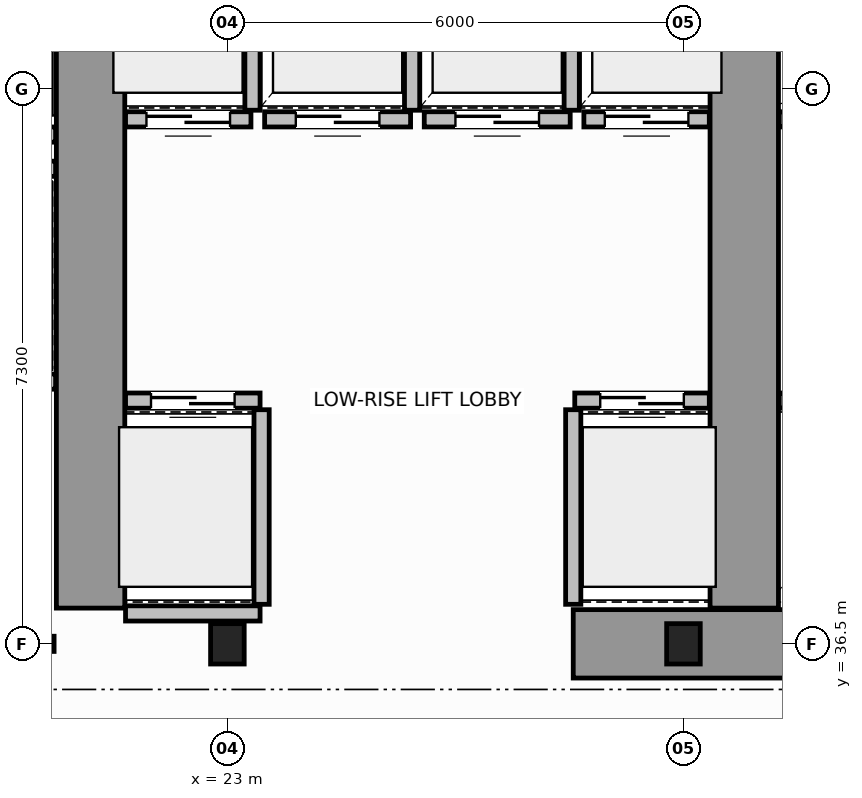
"""IFC4 building model, lengths in metres.
Left out: names, types, materials, properties, quantities, classifications, styles, units other than length and angle.
Written with IfcOpenShell. Run it as: python <this file> out.ifc"""

import sys

from ifc_helpers import new_model, si_unit, direction, frame, frame_2d, origin, origin_2d, place, context, subcontext, project, spatial, rectangle, i_section, extrude, source, transform, mapped, element, fill, save


model = new_model("IFC4")
c1 = context("Model", 3, precision=1e-05, world=origin(), true_north=direction((0.0, 1.0)))
c2 = subcontext(c1, "Body", "Model", "MODEL_VIEW")
j1 = project(units=[si_unit("LENGTHUNIT", "METRE"), si_unit("PLANEANGLEUNIT", "RADIAN")], contexts=[c1])
p1 = place(None, origin())
s1 = spatial("IfcSite", under=j1, at=p1, CompositionType="ELEMENT")
p2 = place(p1, origin())
s2 = spatial("IfcBuilding", under=s1, at=p2, CompositionType="ELEMENT")
p3 = place(p2, frame((0.0, 0.0, 79.6)))
s3 = spatial("IfcBuildingStorey", under=s2, at=p3, CompositionType="ELEMENT", Elevation=79.6)
m1 = source(origin(), c2, "Body", "SweptSolid", [
    extrude(i_section(OverallWidth=0.442, OverallDepth=0.531, WebThickness=0.065, FlangeThickness=0.076, FilletRadius=0.015, at=origin_2d()), origin(), (0.0, 0.0, 1.0), 3.8),
])
for number, where, z_axis, x_axis in (
    (1, (23.0, 36.5, 0.0), (0.0, 0.0, 1.0), (1.0, 0.0, 0.0)),
    (2, (29.0, 36.5, 0.0), (0.0, 0.0, 1.0), (1.0, 0.0, 0.0)),
):
    element("IfcColumn", number, at=place(p3, frame(where, z_axis=z_axis, x_axis=x_axis)), inside=s3, PredefinedType="COLUMN", context=c2, shape_type="MappedRepresentation", body=[
        mapped(m1, transform((0.0, 0.0, 0.0), scale=1.0)),
    ])
p4 = place(p3, frame((27.55, 36.5, 0.0), z_axis=(0.0, 0.0, 1.0), x_axis=(1.0, 0.0, 0.0)))
e3 = element("IfcWall", 3, at=p4, inside=s3, PredefinedType="SHEAR", context=c2, shape_type="SweptSolid", body=[
    extrude(rectangle(XDim=4.5, YDim=0.9, at=frame_2d((2.25, 0.0))), origin(), (0.0, 0.0, 1.0), 3.8),
])
for number, where, z_axis, x_axis in (
    (4, (21.2, 36.97, 0.0), (0.0, 0.0, 1.0), (0.0, 1.0, 0.0)),
    (5, (29.8, 36.97, 0.0), (0.0, 0.0, 1.0), (0.0, 1.0, 0.0)),
):
    element("IfcWall", number, at=place(p3, frame(where, z_axis=z_axis, x_axis=x_axis)), inside=s3, PredefinedType="SHEAR", context=c2, shape_type="SweptSolid", body=[
        extrude(rectangle(XDim=9.23, YDim=0.9, at=frame_2d((4.615, 0.0))), origin(), (0.0, 0.0, 1.0), 3.8),
    ])
p5 = place(p3, frame((18.25, 36.5, 0.0), z_axis=(0.0, 0.0, 1.0), x_axis=(1.0, 0.0, 0.0)))
e6 = element("IfcWall", 6, at=p5, inside=s3, PredefinedType="SOLIDWALL", context=c2, shape_type="SweptSolid", body=[
    extrude(rectangle(XDim=2.47, YDim=0.2, at=frame_2d((1.235, 0.0))), origin(), (0.0, 0.0, 1.0), 2.33),
])
p6 = place(p5, frame((0.65, 0.0, 0.0)))
e7 = element("IfcOpeningElement", 7, at=p6, cuts=e6, PredefinedType="OPENING", context=c2, shape_type="SweptSolid", body=[
    extrude(rectangle(XDim=1.1, YDim=2.15, at=frame_2d((0.55, 1.075))), frame((0.0, 0.11, 0.0), z_axis=(0.0, -1.0, 0.0), x_axis=(1.0, 0.0, 0.0)), (0.0, 0.0, 1.0), 0.22),
])
p7 = place(p3, frame((21.66, 39.7, 0.0), z_axis=(0.0, 0.0, 1.0), x_axis=(1.0, 0.0, 0.0)))
e8 = element("IfcWall", 8, at=p7, inside=s3, PredefinedType="SOLIDWALL", context=c2, shape_type="SweptSolid", body=[
    extrude(rectangle(XDim=1.77, YDim=0.2, at=frame_2d((0.885, 0.0))), origin(), (0.0, 0.0, 1.0), 3.54),
])
p8 = place(p7, frame((0.335, 0.0, 0.0)))
e9 = element("IfcOpeningElement", 9, at=p8, cuts=e8, PredefinedType="OPENING", context=c2, shape_type="SweptSolid", body=[
    extrude(rectangle(XDim=1.1, YDim=2.15, at=frame_2d((0.55, 1.075))), frame((0.0, 0.11, 0.0), z_axis=(0.0, -1.0, 0.0), x_axis=(1.0, 0.0, 0.0)), (0.0, 0.0, 1.0), 0.22),
])
p9 = place(p3, frame((21.66, 36.9, 0.0), z_axis=(0.0, 0.0, 1.0), x_axis=(1.0, 0.0, 0.0)))
e10 = element("IfcWall", 10, at=p9, inside=s3, PredefinedType="SOLIDWALL", context=c2, shape_type="SweptSolid", body=[
    extrude(rectangle(XDim=1.77, YDim=0.2, at=frame_2d((0.885, 0.0))), origin(), (0.0, 0.0, 1.0), 2.33),
])
p10 = place(p3, frame((23.45, 37.02, 0.0), z_axis=(0.0, 0.0, 1.0), x_axis=(0.0, 1.0, 0.0)))
e11 = element("IfcWall", 11, at=p10, inside=s3, PredefinedType="SOLIDWALL", context=c2, shape_type="SweptSolid", body=[
    extrude(rectangle(XDim=2.56, YDim=0.2, at=frame_2d((1.28, 0.0))), origin(), (0.0, 0.0, 1.0), 3.54),
])
p11 = place(p3, frame((27.57, 39.7, 0.0), z_axis=(0.0, 0.0, 1.0), x_axis=(1.0, 0.0, 0.0)))
e12 = element("IfcWall", 12, at=p11, inside=s3, PredefinedType="SOLIDWALL", context=c2, shape_type="SweptSolid", body=[
    extrude(rectangle(XDim=1.77, YDim=0.2, at=frame_2d((0.885, 0.0))), origin(), (0.0, 0.0, 1.0), 3.54),
])
p12 = place(p11, frame((0.335, 0.0, 0.0)))
e13 = element("IfcOpeningElement", 13, at=p12, cuts=e12, PredefinedType="OPENING", context=c2, shape_type="SweptSolid", body=[
    extrude(rectangle(XDim=1.1, YDim=2.15, at=frame_2d((0.55, 1.075))), frame((0.0, 0.11, 0.0), z_axis=(0.0, -1.0, 0.0), x_axis=(1.0, 0.0, 0.0)), (0.0, 0.0, 1.0), 0.22),
])
p13 = place(p3, frame((27.55, 37.02, 0.0), z_axis=(0.0, 0.0, 1.0), x_axis=(0.0, 1.0, 0.0)))
e14 = element("IfcWall", 14, at=p13, inside=s3, PredefinedType="SOLIDWALL", context=c2, shape_type="SweptSolid", body=[
    extrude(rectangle(XDim=2.56, YDim=0.2, at=frame_2d((1.28, 0.0))), origin(), (0.0, 0.0, 1.0), 3.54),
])
p14 = place(p3, frame((21.66, 43.4, 0.0), z_axis=(0.0, 0.0, 1.0), x_axis=(1.0, 0.0, 0.0)))
e15 = element("IfcWall", 15, at=p14, inside=s3, PredefinedType="SOLIDWALL", context=c2, shape_type="SweptSolid", body=[
    extrude(rectangle(XDim=1.65, YDim=0.2, at=frame_2d((0.825, 0.0))), origin(), (0.0, 0.0, 1.0), 3.54),
])
p15 = place(p14, frame((0.275, 0.0, 0.0)))
e16 = element("IfcOpeningElement", 16, at=p15, cuts=e15, PredefinedType="OPENING", context=c2, shape_type="SweptSolid", body=[
    extrude(rectangle(XDim=1.1, YDim=2.15, at=frame_2d((0.55, 1.075))), frame((0.0, 0.11, 0.0), z_axis=(0.0, -1.0, 0.0), x_axis=(1.0, 0.0, 0.0)), (0.0, 0.0, 1.0), 0.22),
])
p16 = place(p3, frame((23.33, 43.52, 0.0), z_axis=(0.0, 0.0, 1.0), x_axis=(0.0, 1.0, 0.0)))
e17 = element("IfcWall", 17, at=p16, inside=s3, PredefinedType="SOLIDWALL", context=c2, shape_type="SweptSolid", body=[
    extrude(rectangle(XDim=2.56, YDim=0.2, at=frame_2d((1.28, 0.0))), origin(), (0.0, 0.0, 1.0), 3.54),
])
p17 = place(p3, frame((23.49, 43.4, 0.0), z_axis=(0.0, 0.0, 1.0), x_axis=(1.0, 0.0, 0.0)))
e18 = element("IfcWall", 18, at=p17, inside=s3, PredefinedType="SOLIDWALL", context=c2, shape_type="SweptSolid", body=[
    extrude(rectangle(XDim=1.92, YDim=0.2, at=frame_2d((0.96, 0.0))), origin(), (0.0, 0.0, 1.0), 3.54),
])
p18 = place(p17, frame((0.41, 0.0, 0.0)))
e19 = element("IfcOpeningElement", 19, at=p18, cuts=e18, PredefinedType="OPENING", context=c2, shape_type="SweptSolid", body=[
    extrude(rectangle(XDim=1.1, YDim=2.15, at=frame_2d((0.55, 1.075))), frame((0.0, 0.11, 0.0), z_axis=(0.0, -1.0, 0.0), x_axis=(1.0, 0.0, 0.0)), (0.0, 0.0, 1.0), 0.22),
])
p19 = place(p3, frame((25.43, 43.52, 0.0), z_axis=(0.0, 0.0, 1.0), x_axis=(0.0, 1.0, 0.0)))
e20 = element("IfcWall", 20, at=p19, inside=s3, PredefinedType="SOLIDWALL", context=c2, shape_type="SweptSolid", body=[
    extrude(rectangle(XDim=2.56, YDim=0.2, at=frame_2d((1.28, 0.0))), origin(), (0.0, 0.0, 1.0), 3.54),
])
p20 = place(p3, frame((25.59, 43.4, 0.0), z_axis=(0.0, 0.0, 1.0), x_axis=(1.0, 0.0, 0.0)))
e21 = element("IfcWall", 21, at=p20, inside=s3, PredefinedType="SOLIDWALL", context=c2, shape_type="SweptSolid", body=[
    extrude(rectangle(XDim=1.92, YDim=0.2, at=frame_2d((0.96, 0.0))), origin(), (0.0, 0.0, 1.0), 3.54),
])
p21 = place(p20, frame((0.41, 0.0, 0.0)))
e22 = element("IfcOpeningElement", 22, at=p21, cuts=e21, PredefinedType="OPENING", context=c2, shape_type="SweptSolid", body=[
    extrude(rectangle(XDim=1.1, YDim=2.15, at=frame_2d((0.55, 1.075))), frame((0.0, 0.11, 0.0), z_axis=(0.0, -1.0, 0.0), x_axis=(1.0, 0.0, 0.0)), (0.0, 0.0, 1.0), 0.22),
])
p22 = place(p3, frame((27.53, 43.52, 0.0), z_axis=(0.0, 0.0, 1.0), x_axis=(0.0, 1.0, 0.0)))
e23 = element("IfcWall", 23, at=p22, inside=s3, PredefinedType="SOLIDWALL", context=c2, shape_type="SweptSolid", body=[
    extrude(rectangle(XDim=2.56, YDim=0.2, at=frame_2d((1.28, 0.0))), origin(), (0.0, 0.0, 1.0), 3.54),
])
p23 = place(p3, frame((27.69, 43.4, 0.0), z_axis=(0.0, 0.0, 1.0), x_axis=(1.0, 0.0, 0.0)))
e24 = element("IfcWall", 24, at=p23, inside=s3, PredefinedType="SOLIDWALL", context=c2, shape_type="SweptSolid", body=[
    extrude(rectangle(XDim=1.65, YDim=0.2, at=frame_2d((0.825, 0.0))), origin(), (0.0, 0.0, 1.0), 3.54),
])
p24 = place(p23, frame((0.275, 0.0, 0.0)))
e25 = element("IfcOpeningElement", 25, at=p24, cuts=e24, PredefinedType="OPENING", context=c2, shape_type="SweptSolid", body=[
    extrude(rectangle(XDim=1.1, YDim=2.15, at=frame_2d((0.55, 1.075))), frame((0.0, 0.11, 0.0), z_axis=(0.0, -1.0, 0.0), x_axis=(1.0, 0.0, 0.0)), (0.0, 0.0, 1.0), 0.22),
])
p25 = place(p3, frame((30.26, 39.7, 0.0), z_axis=(0.0, 0.0, 1.0), x_axis=(1.0, 0.0, 0.0)))
e26 = element("IfcWall", 26, at=p25, inside=s3, PredefinedType="SOLIDWALL", context=c2, shape_type="SweptSolid", body=[
    extrude(rectangle(XDim=1.77, YDim=0.2, at=frame_2d((0.885, 0.0))), origin(), (0.0, 0.0, 1.0), 3.54),
])
p26 = place(p3, frame((30.26, 43.4, 0.0), z_axis=(0.0, 0.0, 1.0), x_axis=(1.0, 0.0, 0.0)))
e27 = element("IfcWall", 27, at=p26, inside=s3, PredefinedType="SOLIDWALL", context=c2, shape_type="SweptSolid", body=[
    extrude(rectangle(XDim=1.65, YDim=0.2, at=frame_2d((0.825, 0.0))), origin(), (0.0, 0.0, 1.0), 3.54),
])
p27 = place(p3, frame((18.67, 43.2, 0.0), z_axis=(0.0, 0.0, 1.0), x_axis=(1.0, 0.0, 0.0)))
e28 = element("IfcWall", 28, at=p27, inside=s3, PredefinedType="SOLIDWALL", context=c2, shape_type="SweptSolid", body=[
    extrude(rectangle(XDim=2.07, YDim=0.2, at=frame_2d((1.035, 0.0))), origin(), (0.0, 0.0, 1.0), 3.54),
])
p28 = place(p3, frame((18.67, 39.95, 0.0), z_axis=(0.0, 0.0, 1.0), x_axis=(1.0, 0.0, 0.0)))
e29 = element("IfcWall", 29, at=p28, inside=s3, PredefinedType="SOLIDWALL", context=c2, shape_type="SweptSolid", body=[
    extrude(rectangle(XDim=2.07, YDim=0.2, at=frame_2d((1.035, 0.0))), origin(), (0.0, 0.0, 1.0), 3.54),
])
p29 = place(p28, frame((0.485, 0.0, 0.0)))
e30 = element("IfcOpeningElement", 30, at=p29, cuts=e29, PredefinedType="OPENING", context=c2, shape_type="SweptSolid", body=[
    extrude(rectangle(XDim=1.1, YDim=2.15, at=frame_2d((0.55, 1.075))), frame((0.0, 0.11, 0.0), z_axis=(0.0, -1.0, 0.0), x_axis=(1.0, 0.0, 0.0)), (0.0, 0.0, 1.0), 0.22),
])
p30 = place(p3, frame((18.67, 42.75, 0.0), z_axis=(0.0, 0.0, 1.0), x_axis=(1.0, 0.0, 0.0)))
e31 = element("IfcWall", 31, at=p30, inside=s3, PredefinedType="SOLIDWALL", context=c2, shape_type="SweptSolid", body=[
    extrude(rectangle(XDim=2.07, YDim=0.2, at=frame_2d((1.035, 0.0))), origin(), (0.0, 0.0, 1.0), 3.54),
])
m2 = source(origin(), c2, "Body", "SweptSolid", [
    extrude(rectangle(XDim=1.1, YDim=2.15, at=frame_2d((0.55, 1.075))), frame((0.0, 0.025, 0.0), z_axis=(0.0, -1.0, 0.0), x_axis=(1.0, 0.0, 0.0)), (0.0, 0.0, 1.0), 0.05),
])
p31 = place(p8, origin())
e32 = element("IfcDoor", 32, at=p31, inside=s3, OperationType="DOUBLE_DOOR_SLIDING", PredefinedType="DOOR", context=c2, shape_type="MappedRepresentation", body=[
    mapped(m2, transform((0.0, 0.0, 0.0), scale=1.0)),
])
fill(e9, e32)
p32 = place(p12, origin())
e33 = element("IfcDoor", 33, at=p32, inside=s3, OperationType="DOUBLE_DOOR_SLIDING", PredefinedType="DOOR", context=c2, shape_type="MappedRepresentation", body=[
    mapped(m2, transform((0.0, 0.0, 0.0), scale=1.0)),
])
fill(e13, e33)
p33 = place(p15, origin())
e34 = element("IfcDoor", 34, at=p33, inside=s3, OperationType="DOUBLE_DOOR_SLIDING", PredefinedType="DOOR", context=c2, shape_type="MappedRepresentation", body=[
    mapped(m2, transform((0.0, 0.0, 0.0), scale=1.0)),
])
fill(e16, e34)
p34 = place(p18, origin())
e35 = element("IfcDoor", 35, at=p34, inside=s3, OperationType="DOUBLE_DOOR_SLIDING", PredefinedType="DOOR", context=c2, shape_type="MappedRepresentation", body=[
    mapped(m2, transform((0.0, 0.0, 0.0), scale=1.0)),
])
fill(e19, e35)
p35 = place(p21, origin())
e36 = element("IfcDoor", 36, at=p35, inside=s3, OperationType="DOUBLE_DOOR_SLIDING", PredefinedType="DOOR", context=c2, shape_type="MappedRepresentation", body=[
    mapped(m2, transform((0.0, 0.0, 0.0), scale=1.0)),
])
fill(e22, e36)
p36 = place(p24, origin())
e37 = element("IfcDoor", 37, at=p36, inside=s3, OperationType="DOUBLE_DOOR_SLIDING", PredefinedType="DOOR", context=c2, shape_type="MappedRepresentation", body=[
    mapped(m2, transform((0.0, 0.0, 0.0), scale=1.0)),
])
fill(e25, e37)
save(model, sys.argv[1])
